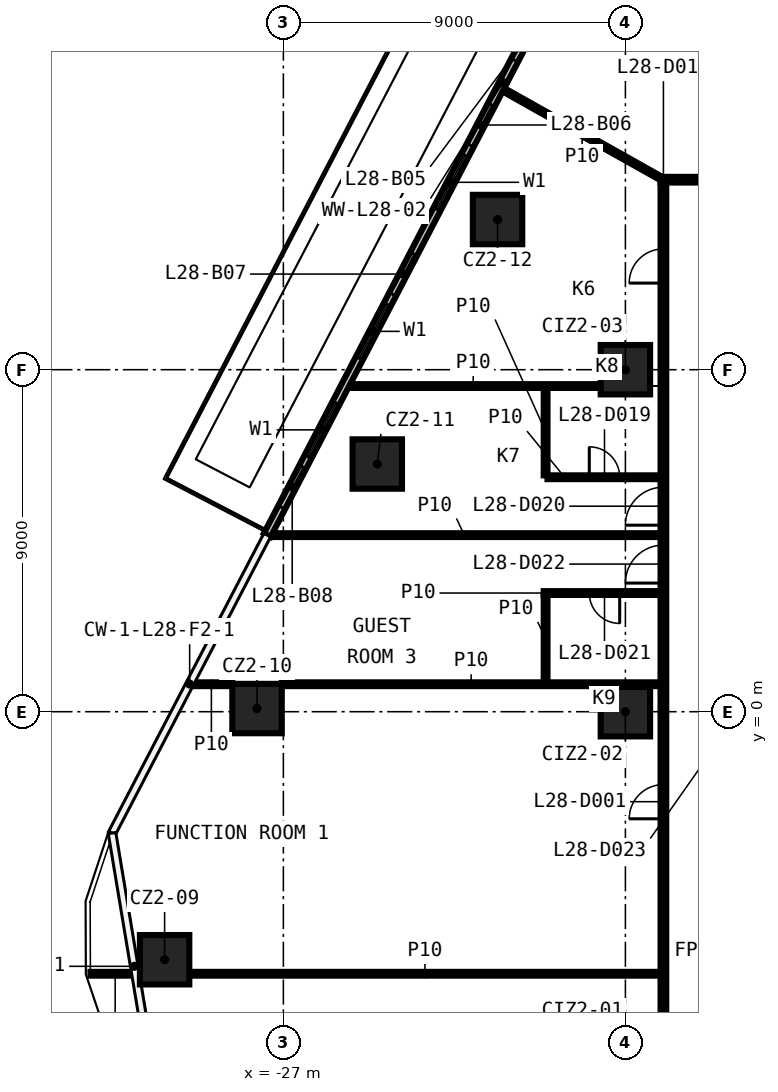
"""IFC4 building model, lengths in metres.
Left out: names, types, materials, properties, quantities, classifications, styles, units other than length and angle.
Written with IfcOpenShell. Run it as: python <this file> out.ifc"""

import sys

from ifc_helpers import new_model, si_unit, direction, frame, frame_2d, origin, origin_2d, place, context, subcontext, project, spatial, rectangle, extrude, element, fill, save


model = new_model("IFC4")
c1 = context("Model", 3, precision=1e-05, world=origin(), true_north=direction((0.0, 1.0)))
c2 = subcontext(c1, "Body", "Model", "MODEL_VIEW")
j1 = project(units=[si_unit("LENGTHUNIT", "METRE"), si_unit("PLANEANGLEUNIT", "RADIAN")], contexts=[c1])
p1 = place(None, origin())
s1 = spatial("IfcSite", under=j1, at=p1, CompositionType="ELEMENT")
p2 = place(p1, origin())
s2 = spatial("IfcBuilding", under=s1, at=p2, CompositionType="ELEMENT")
p3 = place(p2, frame((0.0, 0.0, 128.5)))
s3 = spatial("IfcBuildingStorey", under=s2, at=p3, CompositionType="ELEMENT", Elevation=128.5)
for number, where, z_axis, x_axis in (
    (1, (-30.125, -6.527, 0.0), (0.0, 0.0, 1.0), (1.0, 0.0, 0.0)),
    (2, (-27.693, 0.083, 0.0), (0.0, 0.0, 1.0), (1.0, 0.0, 0.0)),
    (3, (-24.529, 6.518, 0.0), (0.0, 0.0, 1.0), (1.0, 0.0, 0.0)),
    (4, (-21.364, 12.952, 0.0), (0.0, 0.0, 1.0), (1.0, 0.0, 0.0)),
    (5, (-18.0, 0.0, 0.0), (0.0, 0.0, 1.0), (1.0, 0.0, 0.0)),
    (6, (-18.0, 9.0, 0.0), (0.0, 0.0, 1.0), (1.0, 0.0, 0.0)),
):
    element("IfcColumn", number, at=place(p3, frame(where, z_axis=z_axis, x_axis=x_axis)), inside=s3, PredefinedType="COLUMN", context=c2, shape_type="SweptSolid", body=[
        extrude(rectangle(XDim=1.3, YDim=1.3, at=origin_2d()), origin(), (0.0, 0.0, 1.0), 3.3),
    ])
p4 = place(p3, frame((-32.076, -6.896, 0.0), z_axis=(0.0, 0.0, 1.0), x_axis=(1.0, 0.0, 0.0)))
e7 = element("IfcWall", 7, at=p4, inside=s3, PredefinedType="PARTITIONING", context=c2, shape_type="SweptSolid", body=[
    extrude(rectangle(XDim=1.301, YDim=0.1, at=frame_2d((0.651, 0.0))), origin(), (0.0, 0.0, 1.0), 3.3),
])
p5 = place(p3, frame((-29.475, -6.896, 0.0), z_axis=(0.0, 0.0, 1.0), x_axis=(1.0, 0.0, 0.0)))
e8 = element("IfcWall", 8, at=p5, inside=s3, PredefinedType="PARTITIONING", context=c2, shape_type="SweptSolid", body=[
    extrude(rectangle(XDim=12.4, YDim=0.1, at=frame_2d((6.2, 0.0))), origin(), (0.0, 0.0, 1.0), 3.3),
])
p6 = place(p3, frame((-29.446, 0.723, 0.0), z_axis=(0.0, 0.0, 1.0), x_axis=(1.0, 0.0, 0.0)))
e9 = element("IfcWall", 9, at=p6, inside=s3, PredefinedType="PARTITIONING", context=c2, shape_type="SweptSolid", body=[
    extrude(rectangle(XDim=1.103, YDim=0.1, at=frame_2d((0.551, 0.0))), origin(), (0.0, 0.0, 1.0), 3.3),
])
p7 = place(p3, frame((-27.043, 0.723, 0.0), z_axis=(0.0, 0.0, 1.0), x_axis=(1.0, 0.0, 0.0)))
e10 = element("IfcWall", 10, at=p7, inside=s3, PredefinedType="PARTITIONING", context=c2, shape_type="SweptSolid", body=[
    extrude(rectangle(XDim=9.968, YDim=0.1, at=frame_2d((4.984, 0.0))), origin(), (0.0, 0.0, 1.0), 3.3),
])
p8 = place(p3, frame((-17.075, 3.123, 0.0), z_axis=(0.0, 0.0, 1.0), x_axis=(-1.0, 0.0, 0.0)))
e11 = element("IfcWall", 11, at=p8, inside=s3, PredefinedType="PARTITIONING", context=c2, shape_type="SweptSolid", body=[
    extrude(rectangle(XDim=3.075, YDim=0.1, at=frame_2d((1.538, 0.0))), origin(), (0.0, 0.0, 1.0), 3.3),
])
p9 = place(p8, frame((1.075, 0.0, 0.0)))
e12 = element("IfcOpeningElement", 12, at=p9, cuts=e11, PredefinedType="OPENING", context=c2, shape_type="SweptSolid", body=[
    extrude(rectangle(XDim=0.8, YDim=2.1, at=frame_2d((0.4, 1.05))), frame((0.0, 0.06, 0.0), z_axis=(0.0, -1.0, 0.0), x_axis=(1.0, 0.0, 0.0)), (0.0, 0.0, 1.0), 0.12),
])
p10 = place(p3, frame((-27.402, 4.647, 0.0), z_axis=(0.0, 0.0, 1.0), x_axis=(1.0, 0.0, 0.0)))
e13 = element("IfcWall", 13, at=p10, inside=s3, PredefinedType="PARTITIONING", context=c2, shape_type="SweptSolid", body=[
    extrude(rectangle(XDim=10.327, YDim=0.1, at=frame_2d((5.164, 0.0))), origin(), (0.0, 0.0, 1.0), 3.3),
])
p11 = place(p3, frame((-20.05, 6.17, 0.0), z_axis=(0.0, 0.0, 1.0), x_axis=(1.0, 0.0, 0.0)))
e14 = element("IfcWall", 14, at=p11, inside=s3, PredefinedType="PARTITIONING", context=c2, shape_type="SweptSolid", body=[
    extrude(rectangle(XDim=2.975, YDim=0.1, at=frame_2d((1.488, 0.0))), origin(), (0.0, 0.0, 1.0), 3.3),
])
p12 = place(p11, frame((1.1, 0.0, 0.0)))
e15 = element("IfcOpeningElement", 15, at=p12, cuts=e14, PredefinedType="OPENING", context=c2, shape_type="SweptSolid", body=[
    extrude(rectangle(XDim=0.8, YDim=2.1, at=frame_2d((0.4, 1.05))), frame((0.0, 0.06, 0.0), z_axis=(0.0, -1.0, 0.0), x_axis=(1.0, 0.0, 0.0)), (0.0, 0.0, 1.0), 0.12),
])
p13 = place(p3, frame((-25.359, 8.57, 0.0), z_axis=(0.0, 0.0, 1.0), x_axis=(1.0, 0.0, 0.0)))
e16 = element("IfcWall", 16, at=p13, inside=s3, PredefinedType="PARTITIONING", context=c2, shape_type="SweptSolid", body=[
    extrude(rectangle(XDim=6.709, YDim=0.1, at=frame_2d((3.354, 0.0))), origin(), (0.0, 0.0, 1.0), 3.3),
])
p14 = place(p3, frame((-17.075, 14.0, 0.0), z_axis=(0.0, 0.0, 1.0), x_axis=(1.0, 0.0, 0.0)))
e17 = element("IfcWall", 17, at=p14, inside=s3, PredefinedType="PARTITIONING", context=c2, shape_type="SweptSolid", body=[
    extrude(rectangle(XDim=34.15, YDim=0.15, at=frame_2d((17.075, 0.0))), origin(), (0.0, 0.0, 1.0), 3.3),
])
p15 = place(p14, frame((10.954, 0.0, 0.0)))
e18 = element("IfcOpeningElement", 18, at=p15, cuts=e17, PredefinedType="OPENING", context=c2, shape_type="SweptSolid", body=[
    extrude(rectangle(XDim=0.9, YDim=2.1, at=frame_2d((0.45, 1.05))), frame((0.0, 0.085, 0.0), z_axis=(0.0, -1.0, 0.0), x_axis=(1.0, 0.0, 0.0)), (0.0, 0.0, 1.0), 0.17),
])
p16 = place(p14, frame((7.617, 0.0, 0.0)))
e19 = element("IfcOpeningElement", 19, at=p16, cuts=e17, PredefinedType="OPENING", context=c2, shape_type="SweptSolid", body=[
    extrude(rectangle(XDim=1.0, YDim=2.1, at=frame_2d((0.5, 1.05))), frame((0.0, 0.085, 0.0), z_axis=(0.0, -1.0, 0.0), x_axis=(1.0, 0.0, 0.0)), (0.0, 0.0, 1.0), 0.17),
])
p17 = place(p14, frame((2.425, 0.0, 0.0)))
e20 = element("IfcOpeningElement", 20, at=p17, cuts=e17, PredefinedType="OPENING", context=c2, shape_type="SweptSolid", body=[
    extrude(rectangle(XDim=0.9, YDim=2.1, at=frame_2d((0.45, 1.05))), frame((0.0, 0.085, 0.0), z_axis=(0.0, -1.0, 0.0), x_axis=(1.0, 0.0, 0.0)), (0.0, 0.0, 1.0), 0.17),
])
p18 = place(p3, frame((-17.0, -13.925, 0.0), z_axis=(0.0, 0.0, 1.0), x_axis=(0.0, 1.0, 0.0)))
e21 = element("IfcWall", 21, at=p18, inside=s3, PredefinedType="PARTITIONING", context=c2, shape_type="SweptSolid", body=[
    extrude(rectangle(XDim=27.85, YDim=0.15, at=frame_2d((13.925, 0.0))), origin(), (0.0, 0.0, 1.0), 3.3),
])
p19 = place(p18, frame((11.107, 0.0, 0.0)))
e22 = element("IfcOpeningElement", 22, at=p19, cuts=e21, PredefinedType="OPENING", context=c2, shape_type="SweptSolid", body=[
    extrude(rectangle(XDim=0.9, YDim=2.1, at=frame_2d((0.45, 1.05))), frame((0.0, 0.085, 0.0), z_axis=(0.0, -1.0, 0.0), x_axis=(1.0, 0.0, 0.0)), (0.0, 0.0, 1.0), 0.17),
])
p20 = place(p18, frame((25.204, 0.0, 0.0)))
e23 = element("IfcOpeningElement", 23, at=p20, cuts=e21, PredefinedType="OPENING", context=c2, shape_type="SweptSolid", body=[
    extrude(rectangle(XDim=0.9, YDim=2.1, at=frame_2d((0.45, 1.05))), frame((0.0, 0.085, 0.0), z_axis=(0.0, -1.0, 0.0), x_axis=(1.0, 0.0, 0.0)), (0.0, 0.0, 1.0), 0.17),
])
p21 = place(p18, frame((18.833, 0.0, 0.0)))
e24 = element("IfcOpeningElement", 24, at=p21, cuts=e21, PredefinedType="OPENING", context=c2, shape_type="SweptSolid", body=[
    extrude(rectangle(XDim=1.0, YDim=2.1, at=frame_2d((0.5, 1.05))), frame((0.0, 0.085, 0.0), z_axis=(0.0, -1.0, 0.0), x_axis=(1.0, 0.0, 0.0)), (0.0, 0.0, 1.0), 0.17),
])
p22 = place(p18, frame((17.31, 0.0, 0.0)))
e25 = element("IfcOpeningElement", 25, at=p22, cuts=e21, PredefinedType="OPENING", context=c2, shape_type="SweptSolid", body=[
    extrude(rectangle(XDim=1.0, YDim=2.1, at=frame_2d((0.5, 1.05))), frame((0.0, 0.085, 0.0), z_axis=(0.0, -1.0, 0.0), x_axis=(1.0, 0.0, 0.0)), (0.0, 0.0, 1.0), 0.17),
])
for number, where, z_axis, x_axis in (
    (26, (-20.1, 0.773, 0.0), (0.0, 0.0, 1.0), (0.0, 1.0, 0.0)),
    (27, (-20.1, 6.219, 0.0), (0.0, 0.0, 1.0), (0.0, 1.0, 0.0)),
):
    element("IfcWall", number, at=place(p3, frame(where, z_axis=z_axis, x_axis=x_axis)), inside=s3, PredefinedType="PARTITIONING", context=c2, shape_type="SweptSolid", body=[
        extrude(rectangle(XDim=2.3, YDim=0.1, at=frame_2d((1.15, 0.0))), origin(), (0.0, 0.0, 1.0), 3.3),
    ])
p23 = place(p3, frame((-21.279, 16.405, 0.0), z_axis=(0.0, 0.0, 1.0), x_axis=(0.871729599924, -0.489987249443, 0.0)))
e28 = element("IfcWall", 28, at=p23, inside=s3, PredefinedType="PARTITIONING", context=c2, shape_type="SweptSolid", body=[
    extrude(rectangle(XDim=4.908, YDim=0.1, at=frame_2d((2.454, 0.0))), origin(), (0.0, 0.0, 1.0), 3.3),
])
p24 = place(p3, frame((-17.21, 24.26, 0.0), z_axis=(0.0, 0.0, 1.0), x_axis=(-0.461902936619, -0.886930480445, 0.0)))
e29 = element("IfcWall", 29, at=p24, inside=s3, PredefinedType="SOLIDWALL", context=c2, shape_type="SweptSolid", body=[
    extrude(rectangle(XDim=22.113, YDim=0.2, at=frame_2d((11.057, 0.0))), origin(), (0.0, 0.0, 1.0), 3.3),
])
p25 = place(p24, frame((2.0, 0.0, 0.6)))
e30 = element("IfcOpeningElement", 30, at=p25, cuts=e29, PredefinedType="OPENING", context=c2, shape_type="SweptSolid", body=[
    extrude(rectangle(XDim=1.6, YDim=2.4, at=frame_2d((0.8, 1.2))), frame((0.0, 0.11, 0.0), z_axis=(0.0, -1.0, 0.0), x_axis=(1.0, 0.0, 0.0)), (0.0, 0.0, 1.0), 0.22),
])
p26 = place(p24, frame((0.5, 0.0, 0.0)))
e31 = element("IfcOpeningElement", 31, at=p26, cuts=e29, PredefinedType="OPENING", context=c2, shape_type="SweptSolid", body=[
    extrude(rectangle(XDim=1.2, YDim=2.4, at=frame_2d((0.6, 1.2))), frame((0.0, 0.11, 0.0), z_axis=(0.0, -1.0, 0.0), x_axis=(1.0, 0.0, 0.0)), (0.0, 0.0, 1.0), 0.22),
])
p27 = place(p24, frame((4.923, 0.0, 0.6)))
e32 = element("IfcOpeningElement", 32, at=p27, cuts=e29, PredefinedType="OPENING", context=c2, shape_type="SweptSolid", body=[
    extrude(rectangle(XDim=1.6, YDim=2.4, at=frame_2d((0.8, 1.2))), frame((0.0, 0.11, 0.0), z_axis=(0.0, -1.0, 0.0), x_axis=(1.0, 0.0, 0.0)), (0.0, 0.0, 1.0), 0.22),
])
p28 = place(p24, frame((6.823, 0.0, 0.0)))
e33 = element("IfcOpeningElement", 33, at=p28, cuts=e29, PredefinedType="OPENING", context=c2, shape_type="SweptSolid", body=[
    extrude(rectangle(XDim=1.2, YDim=2.4, at=frame_2d((0.6, 1.2))), frame((0.0, 0.11, 0.0), z_axis=(0.0, -1.0, 0.0), x_axis=(1.0, 0.0, 0.0)), (0.0, 0.0, 1.0), 0.22),
])
p29 = place(p24, frame((10.845, 0.0, 0.6)))
e34 = element("IfcOpeningElement", 34, at=p29, cuts=e29, PredefinedType="OPENING", context=c2, shape_type="SweptSolid", body=[
    extrude(rectangle(XDim=1.6, YDim=2.4, at=frame_2d((0.8, 1.2))), frame((0.0, 0.11, 0.0), z_axis=(0.0, -1.0, 0.0), x_axis=(1.0, 0.0, 0.0)), (0.0, 0.0, 1.0), 0.22),
])
p30 = place(p24, frame((9.345, 0.0, 0.0)))
e35 = element("IfcOpeningElement", 35, at=p30, cuts=e29, PredefinedType="OPENING", context=c2, shape_type="SweptSolid", body=[
    extrude(rectangle(XDim=1.2, YDim=2.4, at=frame_2d((0.6, 1.2))), frame((0.0, 0.11, 0.0), z_axis=(0.0, -1.0, 0.0), x_axis=(1.0, 0.0, 0.0)), (0.0, 0.0, 1.0), 0.22),
])
p31 = place(p24, frame((15.268, 0.0, 0.6)))
e36 = element("IfcOpeningElement", 36, at=p31, cuts=e29, PredefinedType="OPENING", context=c2, shape_type="SweptSolid", body=[
    extrude(rectangle(XDim=1.6, YDim=2.4, at=frame_2d((0.8, 1.2))), frame((0.0, 0.11, 0.0), z_axis=(0.0, -1.0, 0.0), x_axis=(1.0, 0.0, 0.0)), (0.0, 0.0, 1.0), 0.22),
])
p32 = place(p24, frame((13.768, 0.0, 0.0)))
e37 = element("IfcOpeningElement", 37, at=p32, cuts=e29, PredefinedType="OPENING", context=c2, shape_type="SweptSolid", body=[
    extrude(rectangle(XDim=1.2, YDim=2.4, at=frame_2d((0.6, 1.2))), frame((0.0, 0.11, 0.0), z_axis=(0.0, -1.0, 0.0), x_axis=(1.0, 0.0, 0.0)), (0.0, 0.0, 1.0), 0.22),
])
p33 = place(p24, frame((18.19, 0.0, 0.6)))
e38 = element("IfcOpeningElement", 38, at=p33, cuts=e29, PredefinedType="OPENING", context=c2, shape_type="SweptSolid", body=[
    extrude(rectangle(XDim=1.6, YDim=2.4, at=frame_2d((0.8, 1.2))), frame((0.0, 0.11, 0.0), z_axis=(0.0, -1.0, 0.0), x_axis=(1.0, 0.0, 0.0)), (0.0, 0.0, 1.0), 0.22),
])
p34 = place(p24, frame((20.09, 0.0, 0.0)))
e39 = element("IfcOpeningElement", 39, at=p34, cuts=e29, PredefinedType="OPENING", context=c2, shape_type="SweptSolid", body=[
    extrude(rectangle(XDim=1.2, YDim=2.4, at=frame_2d((0.6, 1.2))), frame((0.0, 0.11, 0.0), z_axis=(0.0, -1.0, 0.0), x_axis=(1.0, 0.0, 0.0)), (0.0, 0.0, 1.0), 0.22),
])
p35 = place(p19, origin())
e40 = element("IfcDoor", 40, at=p35, inside=s3, OperationType="SINGLE_SWING_RIGHT", PredefinedType="DOOR", context=c2, shape_type="SweptSolid", body=[
    extrude(rectangle(XDim=0.9, YDim=2.1, at=frame_2d((0.45, 1.05))), frame((0.0, 0.025, 0.0), z_axis=(0.0, -1.0, 0.0), x_axis=(1.0, 0.0, 0.0)), (0.0, 0.0, 1.0), 0.05),
])
fill(e22, e40)
p36 = place(p20, origin())
e41 = element("IfcDoor", 41, at=p36, inside=s3, OperationType="SINGLE_SWING_LEFT", PredefinedType="DOOR", context=c2, shape_type="SweptSolid", body=[
    extrude(rectangle(XDim=0.9, YDim=2.1, at=frame_2d((0.45, 1.05))), frame((0.0, 0.025, 0.0), z_axis=(0.0, -1.0, 0.0), x_axis=(1.0, 0.0, 0.0)), (0.0, 0.0, 1.0), 0.05),
])
fill(e23, e41)
p37 = place(p12, origin())
e42 = element("IfcDoor", 42, at=p37, inside=s3, OperationType="SINGLE_SWING_LEFT", PredefinedType="DOOR", context=c2, shape_type="SweptSolid", body=[
    extrude(rectangle(XDim=0.8, YDim=2.1, at=frame_2d((0.4, 1.05))), frame((0.0, 0.025, 0.0), z_axis=(0.0, -1.0, 0.0), x_axis=(1.0, 0.0, 0.0)), (0.0, 0.0, 1.0), 0.05),
])
fill(e15, e42)
p38 = place(p21, origin())
e43 = element("IfcDoor", 43, at=p38, inside=s3, OperationType="SINGLE_SWING_RIGHT", PredefinedType="DOOR", context=c2, shape_type="SweptSolid", body=[
    extrude(rectangle(XDim=1.0, YDim=2.1, at=frame_2d((0.5, 1.05))), frame((0.0, 0.025, 0.0), z_axis=(0.0, -1.0, 0.0), x_axis=(1.0, 0.0, 0.0)), (0.0, 0.0, 1.0), 0.05),
])
fill(e24, e43)
p39 = place(p9, origin())
e44 = element("IfcDoor", 44, at=p39, inside=s3, OperationType="SINGLE_SWING_RIGHT", PredefinedType="DOOR", context=c2, shape_type="SweptSolid", body=[
    extrude(rectangle(XDim=0.8, YDim=2.1, at=frame_2d((0.4, 1.05))), frame((0.0, 0.025, 0.0), z_axis=(0.0, -1.0, 0.0), x_axis=(1.0, 0.0, 0.0)), (0.0, 0.0, 1.0), 0.05),
])
fill(e12, e44)
p40 = place(p22, origin())
e45 = element("IfcDoor", 45, at=p40, inside=s3, OperationType="SINGLE_SWING_LEFT", PredefinedType="DOOR", context=c2, shape_type="SweptSolid", body=[
    extrude(rectangle(XDim=1.0, YDim=2.1, at=frame_2d((0.5, 1.05))), frame((0.0, 0.025, 0.0), z_axis=(0.0, -1.0, 0.0), x_axis=(1.0, 0.0, 0.0)), (0.0, 0.0, 1.0), 0.05),
])
fill(e25, e45)
p41 = place(p28, origin())
e46 = element("IfcDoor", 46, at=p41, inside=s3, OperationType="SLIDING_TO_LEFT", PredefinedType="DOOR", context=c2, shape_type="SweptSolid", body=[
    extrude(rectangle(XDim=1.2, YDim=2.4, at=frame_2d((0.6, 1.2))), frame((0.0, 0.025, 0.0), z_axis=(0.0, -1.0, 0.0), x_axis=(1.0, 0.0, 0.0)), (0.0, 0.0, 1.0), 0.05),
])
fill(e33, e46)
p42 = place(p29, origin())
e47 = element("IfcWindow", 47, at=p42, inside=s3, PartitioningType="SINGLE_PANEL", PredefinedType="WINDOW", context=c2, shape_type="SweptSolid", body=[
    extrude(rectangle(XDim=1.6, YDim=2.4, at=frame_2d((0.8, 1.2))), frame((0.0, 0.03, 0.0), z_axis=(0.0, -1.0, 0.0), x_axis=(1.0, 0.0, 0.0)), (0.0, 0.0, 1.0), 0.06),
])
fill(e34, e47)
p43 = place(p30, origin())
e48 = element("IfcDoor", 48, at=p43, inside=s3, OperationType="SLIDING_TO_LEFT", PredefinedType="DOOR", context=c2, shape_type="SweptSolid", body=[
    extrude(rectangle(XDim=1.2, YDim=2.4, at=frame_2d((0.6, 1.2))), frame((0.0, 0.025, 0.0), z_axis=(0.0, -1.0, 0.0), x_axis=(1.0, 0.0, 0.0)), (0.0, 0.0, 1.0), 0.05),
])
fill(e35, e48)
p44 = place(p31, origin())
e49 = element("IfcWindow", 49, at=p44, inside=s3, PartitioningType="SINGLE_PANEL", PredefinedType="WINDOW", context=c2, shape_type="SweptSolid", body=[
    extrude(rectangle(XDim=1.6, YDim=2.4, at=frame_2d((0.8, 1.2))), frame((0.0, 0.03, 0.0), z_axis=(0.0, -1.0, 0.0), x_axis=(1.0, 0.0, 0.0)), (0.0, 0.0, 1.0), 0.06),
])
fill(e36, e49)
p45 = place(p32, origin())
e50 = element("IfcDoor", 50, at=p45, inside=s3, OperationType="SLIDING_TO_LEFT", PredefinedType="DOOR", context=c2, shape_type="SweptSolid", body=[
    extrude(rectangle(XDim=1.2, YDim=2.4, at=frame_2d((0.6, 1.2))), frame((0.0, 0.025, 0.0), z_axis=(0.0, -1.0, 0.0), x_axis=(1.0, 0.0, 0.0)), (0.0, 0.0, 1.0), 0.05),
])
fill(e37, e50)
p46 = place(p33, origin())
e51 = element("IfcWindow", 51, at=p46, inside=s3, PartitioningType="SINGLE_PANEL", PredefinedType="WINDOW", context=c2, shape_type="SweptSolid", body=[
    extrude(rectangle(XDim=1.6, YDim=2.4, at=frame_2d((0.8, 1.2))), frame((0.0, 0.03, 0.0), z_axis=(0.0, -1.0, 0.0), x_axis=(1.0, 0.0, 0.0)), (0.0, 0.0, 1.0), 0.06),
])
fill(e38, e51)
p47 = place(p34, origin())
e52 = element("IfcDoor", 52, at=p47, inside=s3, OperationType="SLIDING_TO_LEFT", PredefinedType="DOOR", context=c2, shape_type="SweptSolid", body=[
    extrude(rectangle(XDim=1.2, YDim=2.4, at=frame_2d((0.6, 1.2))), frame((0.0, 0.025, 0.0), z_axis=(0.0, -1.0, 0.0), x_axis=(1.0, 0.0, 0.0)), (0.0, 0.0, 1.0), 0.05),
])
fill(e39, e52)
save(model, sys.argv[1])
